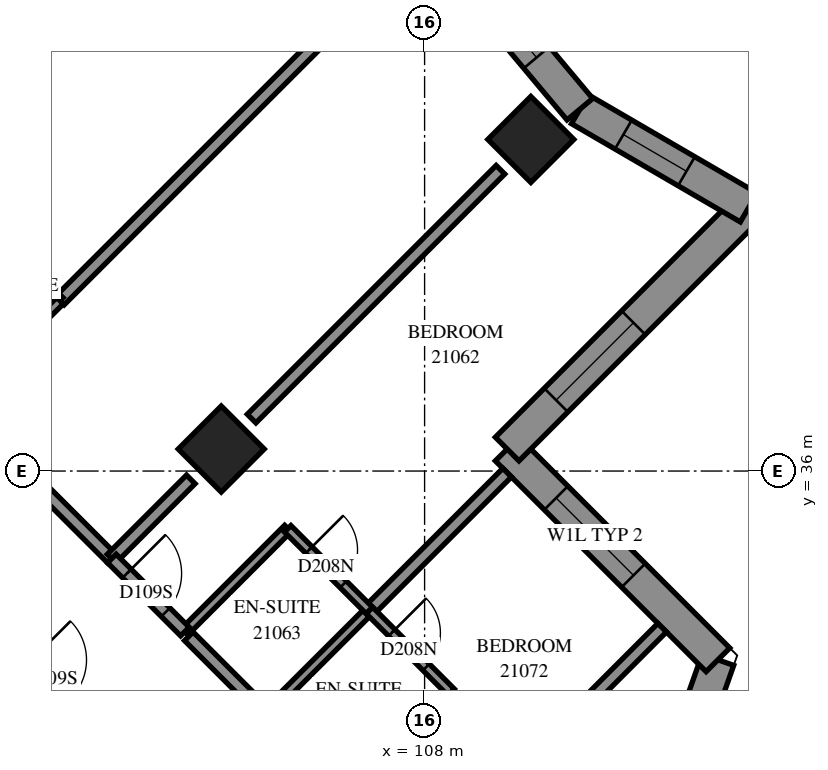
"""IFC4 building model, lengths in metres.
Left out: names, types, materials, properties, quantities, classifications, styles, units other than length and angle.
Written with IfcOpenShell. Run it as: python <this file> out.ifc"""

import sys

from ifc_helpers import new_model, si_unit, direction, frame, frame_2d, origin, origin_2d, place, context, subcontext, project, spatial, polyline, rectangle, outline, extrude, element, fill, save


model = new_model("IFC4")
c1 = context("Model", 3, precision=1e-05, world=origin(), true_north=direction((0.0, 1.0)))
c2 = subcontext(c1, "Body", "Model", "MODEL_VIEW")
j1 = project(units=[si_unit("LENGTHUNIT", "METRE"), si_unit("PLANEANGLEUNIT", "RADIAN")], contexts=[c1])
p1 = place(None, origin())
s1 = spatial("IfcSite", under=j1, at=p1, CompositionType="ELEMENT")
p2 = place(p1, origin())
s2 = spatial("IfcBuilding", under=s1, at=p2, CompositionType="ELEMENT")
p3 = place(p2, frame((0.0, 0.0, 81.2)))
s3 = spatial("IfcBuildingStorey", under=s2, at=p3, CompositionType="ELEMENT", Elevation=81.2)
for number, where, z_axis, x_axis in (
    (1, (109.747, 41.453, 0.0), (0.0, 0.0, 1.0), (0.707, -0.707, 0.0)),
    (2, (104.656, 36.362, 0.0), (0.0, 0.0, 1.0), (0.707, -0.707, 0.0)),
):
    element("IfcColumn", number, at=place(p3, frame(where, z_axis=z_axis, x_axis=x_axis)), inside=s3, PredefinedType="COLUMN", context=c2, shape_type="SweptSolid", body=[
        extrude(rectangle(XDim=1.0, YDim=1.0, at=origin_2d()), origin(), (0.0, 0.0, 1.0), 3.1),
    ])
p4 = place(p3, frame((111.068, 27.928, 0.0), z_axis=(0.0, 0.0, 1.0), x_axis=(0.3333124239, 0.9428164339, 0.0)))
e3 = element("IfcWall", 3, at=p4, inside=s3, PredefinedType="SOLIDWALL", context=c2, shape_type="SweptSolid", body=[
    extrude(outline(polyline([(-0.126, -0.275), (5.443, -0.275), (5.096, 0.275), (0.126, 0.275), (-0.126, -0.275)])), origin(), (0.0, 0.0, 1.0), 3.1),
])
p5 = place(p4, frame((1.434, 0.0, 0.5)))
e4 = element("IfcOpeningElement", 4, at=p5, cuts=e3, PredefinedType="OPENING", context=c2, shape_type="SweptSolid", body=[
    extrude(rectangle(XDim=1.3, YDim=2.45, at=frame_2d((0.65, 1.225))), frame((0.0, 0.285, 0.0), z_axis=(0.0, -1.0, 0.0), x_axis=(1.0, 0.0, 0.0)), (0.0, 0.0, 1.0), 0.57),
])
p6 = place(p4, frame((2.934, 0.0, 0.5)))
e5 = element("IfcOpeningElement", 5, at=p6, cuts=e3, PredefinedType="OPENING", context=c2, shape_type="SweptSolid", body=[
    extrude(rectangle(XDim=1.3, YDim=2.45, at=frame_2d((0.65, 1.225))), frame((0.0, 0.285, 0.0), z_axis=(0.0, -1.0, 0.0), x_axis=(1.0, 0.0, 0.0)), (0.0, 0.0, 1.0), 0.57),
])
p7 = place(p3, frame((112.824, 32.896, 0.0), z_axis=(0.0, 0.0, 1.0), x_axis=(-0.7071067812, 0.7071067812, 0.0)))
e6 = element("IfcWall", 6, at=p7, inside=s3, PredefinedType="SOLIDWALL", context=c2, shape_type="SweptSolid", body=[
    extrude(outline(polyline([(-0.173, -0.275), (4.627, -0.275), (5.177, 0.275), (0.173, 0.275), (-0.173, -0.275)])), origin(), (0.0, 0.0, 1.0), 3.1),
])
p8 = place(p7, frame((1.964, 0.0, 0.6)))
e7 = element("IfcOpeningElement", 7, at=p8, cuts=e6, PredefinedType="OPENING", context=c2, shape_type="SweptSolid", body=[
    extrude(rectangle(XDim=1.8, YDim=1.9, at=frame_2d((0.9, 0.95))), frame((0.0, 0.285, 0.0), z_axis=(0.0, -1.0, 0.0), x_axis=(1.0, 0.0, 0.0)), (0.0, 0.0, 1.0), 0.57),
])
p9 = place(p3, frame((109.358, 36.362, 0.0), z_axis=(0.0, 0.0, 1.0), x_axis=(0.7071067812, 0.7071067812, 0.0)))
e8 = element("IfcWall", 8, at=p9, inside=s3, PredefinedType="SOLIDWALL", context=c2, shape_type="SweptSolid", body=[
    extrude(outline(polyline([(0.275, -0.275), (5.975, -0.275), (5.261, 0.275), (-0.275, 0.275), (0.275, -0.275)])), origin(), (0.0, 0.0, 1.0), 3.1),
])
p10 = place(p9, frame((1.137, 0.0, 0.6)))
e9 = element("IfcOpeningElement", 9, at=p10, cuts=e8, PredefinedType="OPENING", context=c2, shape_type="SweptSolid", body=[
    extrude(rectangle(XDim=1.8, YDim=1.9, at=frame_2d((0.9, 0.95))), frame((0.0, 0.285, 0.0), z_axis=(0.0, -1.0, 0.0), x_axis=(1.0, 0.0, 0.0)), (0.0, 0.0, 1.0), 0.57),
])
p11 = place(p3, frame((113.331, 40.334, 0.0), z_axis=(0.0, 0.0, 1.0), x_axis=(-0.8643225085, 0.5029379696, 0.0)))
e10 = element("IfcWall", 10, at=p11, inside=s3, PredefinedType="SOLIDWALL", context=c2, shape_type="SweptSolid", body=[
    extrude(outline(polyline([(-0.357, -0.275), (3.165, -0.275), (3.261, 0.275), (0.357, 0.275), (-0.357, -0.275)])), origin(), (0.0, 0.0, 1.0), 3.1),
])
p12 = place(p11, frame((1.185, 0.0, 0.5)))
e11 = element("IfcOpeningElement", 11, at=p12, cuts=e10, PredefinedType="OPENING", context=c2, shape_type="SweptSolid", body=[
    extrude(rectangle(XDim=1.2, YDim=2.45, at=frame_2d((0.6, 1.225))), frame((0.0, 0.285, 0.0), z_axis=(0.0, -1.0, 0.0), x_axis=(1.0, 0.0, 0.0)), (0.0, 0.0, 1.0), 0.57),
])
p13 = place(p3, frame((110.553, 41.95, 0.0), z_axis=(0.0, 0.0, 1.0), x_axis=(-0.6423052098, 0.766448966, 0.0)))
e12 = element("IfcWall", 12, at=p13, inside=s3, PredefinedType="SOLIDWALL", context=c2, shape_type="SweptSolid", body=[
    extrude(outline(polyline([(0.048, -0.275), (3.466, -0.275), (3.418, 0.275), (-0.048, 0.275), (0.048, -0.275)])), origin(), (0.0, 0.0, 1.0), 3.1),
])
p14 = place(p13, frame((1.109, 0.0, 0.5)))
e13 = element("IfcOpeningElement", 13, at=p14, cuts=e12, PredefinedType="OPENING", context=c2, shape_type="SweptSolid", body=[
    extrude(rectangle(XDim=1.2, YDim=2.45, at=frame_2d((0.6, 1.225))), frame((0.0, 0.285, 0.0), z_axis=(0.0, -1.0, 0.0), x_axis=(1.0, 0.0, 0.0)), (0.0, 0.0, 1.0), 0.57),
])
p15 = place(p3, frame((95.215, 42.197, 0.0), z_axis=(0.0, 0.0, 1.0), x_axis=(0.7071114855, 0.7071020769, 0.0)))
e14 = element("IfcWall", 14, at=p15, inside=s3, PredefinedType="PARTITIONING", context=c2, shape_type="SweptSolid", body=[
    extrude(rectangle(XDim=10.629, YDim=0.2, at=frame_2d((5.314, 0.0))), origin(), (0.0, 0.0, 1.0), 3.1),
])
p16 = place(p3, frame((102.002, 38.804, 0.0), z_axis=(0.0, 0.0, 1.0), x_axis=(0.7072398927, 0.7069736446, 0.0)))
e15 = element("IfcWall", 15, at=p16, inside=s3, PredefinedType="PARTITIONING", context=c2, shape_type="SweptSolid", body=[
    extrude(rectangle(XDim=8.263, YDim=0.2, at=frame_2d((4.131, 0.0))), origin(), (0.0, 0.0, 1.0), 3.1),
])
p17 = place(p3, frame((101.365, 33.071, 0.0), z_axis=(0.0, 0.0, 1.0), x_axis=(0.7071067812, -0.7071067812, 0.0)))
e16 = element("IfcWall", 16, at=p17, inside=s3, PredefinedType="PARTITIONING", context=c2, shape_type="SweptSolid", body=[
    extrude(rectangle(XDim=7.2, YDim=0.2, at=frame_2d((3.6, 0.0))), origin(), (0.0, 0.0, 1.0), 3.1),
])
p18 = place(p17, frame((0.248, 0.0, 0.0)))
e17 = element("IfcOpeningElement", 17, at=p18, cuts=e16, PredefinedType="OPENING", context=c2, shape_type="SweptSolid", body=[
    extrude(rectangle(XDim=0.9, YDim=2.1, at=frame_2d((0.45, 1.05))), frame((0.0, 0.11, 0.0), z_axis=(0.0, -1.0, 0.0), x_axis=(1.0, 0.0, 0.0)), (0.0, 0.0, 1.0), 0.22),
])
p19 = place(p17, frame((5.95, 0.0, 0.0)))
e18 = element("IfcOpeningElement", 18, at=p19, cuts=e16, PredefinedType="OPENING", context=c2, shape_type="SweptSolid", body=[
    extrude(rectangle(XDim=0.9, YDim=2.1, at=frame_2d((0.45, 1.05))), frame((0.0, 0.11, 0.0), z_axis=(0.0, -1.0, 0.0), x_axis=(1.0, 0.0, 0.0)), (0.0, 0.0, 1.0), 0.22),
])
p20 = place(p3, frame((105.155, 36.863, 0.0), z_axis=(0.0, 0.0, 1.0), x_axis=(0.7071067812, 0.7071067812, 0.0)))
e19 = element("IfcWall", 19, at=p20, inside=s3, PredefinedType="PARTITIONING", context=c2, shape_type="SweptSolid", body=[
    extrude(rectangle(XDim=5.787, YDim=0.2, at=frame_2d((2.893, 0.0))), origin(), (0.0, 0.0, 1.0), 3.1),
])
p21 = place(p3, frame((104.123, 33.282, 0.0), z_axis=(0.0, 0.0, 1.0), x_axis=(0.7071067812, -0.7071067812, 0.0)))
e20 = element("IfcWall", 20, at=p21, inside=s3, PredefinedType="PARTITIONING", context=c2, shape_type="SweptSolid", body=[
    extrude(rectangle(XDim=5.399, YDim=0.2, at=frame_2d((2.7, 0.0))), origin(), (0.0, 0.0, 1.0), 3.1),
])
p22 = place(p21, frame((4.08, 0.0, 0.0)))
e21 = element("IfcOpeningElement", 21, at=p22, cuts=e20, PredefinedType="OPENING", context=c2, shape_type="SweptSolid", body=[
    extrude(rectangle(XDim=0.9, YDim=2.1, at=frame_2d((0.45, 1.05))), frame((0.0, 0.11, 0.0), z_axis=(0.0, -1.0, 0.0), x_axis=(1.0, 0.0, 0.0)), (0.0, 0.0, 1.0), 0.22),
])
p23 = place(p3, frame((100.31, 37.106, 0.0), z_axis=(0.0, 0.0, 1.0), x_axis=(0.7073845681, -0.7068288851, 0.0)))
e22 = element("IfcWall", 22, at=p23, inside=s3, PredefinedType="PARTITIONING", context=c2, shape_type="SweptSolid", body=[
    extrude(rectangle(XDim=3.599, YDim=0.2, at=frame_2d((1.8, 0.0))), origin(), (0.0, 0.0, 1.0), 3.1),
])
p24 = place(p3, frame((107.095, 33.711, 0.0), z_axis=(0.0, 0.0, 1.0), x_axis=(0.7071067812, 0.7071067812, 0.0)))
e23 = element("IfcWall", 23, at=p24, inside=s3, PredefinedType="PARTITIONING", context=c2, shape_type="SweptSolid", body=[
    extrude(rectangle(XDim=3.2, YDim=0.2, at=frame_2d((1.6, 0.0))), origin(), (0.0, 0.0, 1.0), 3.1),
])
p25 = place(p3, frame((100.233, 40.567, 0.0), z_axis=(0.0, 0.0, 1.0), x_axis=(0.7071067812, -0.7071067812, 0.0)))
e24 = element("IfcWall", 24, at=p25, inside=s3, PredefinedType="PARTITIONING", context=c2, shape_type="SweptSolid", body=[
    extrude(rectangle(XDim=2.5, YDim=0.15, at=frame_2d((1.25, 0.0))), origin(), (0.0, 0.0, 1.0), 3.1),
])
p26 = place(p25, frame((0.883, 0.0, 0.0)))
e25 = element("IfcOpeningElement", 25, at=p26, cuts=e24, PredefinedType="OPENING", context=c2, shape_type="SweptSolid", body=[
    extrude(rectangle(XDim=0.8, YDim=2.1, at=frame_2d((0.4, 1.05))), frame((0.0, 0.085, 0.0), z_axis=(0.0, -1.0, 0.0), x_axis=(1.0, 0.0, 0.0)), (0.0, 0.0, 1.0), 0.17),
])
for number, where, z_axis, x_axis in (
    (26, (100.308, 37.103, 0.0), (0.0, 0.0, 1.0), (0.707, 0.708, 0.0)),
    (27, (105.396, 32.016, 0.0), (0.0, 0.0, 1.0), (0.708, 0.707, 0.0)),
):
    element("IfcWall", number, at=place(p3, frame(where, z_axis=z_axis, x_axis=x_axis)), inside=s3, PredefinedType="PARTITIONING", context=c2, shape_type="SweptSolid", body=[
        extrude(rectangle(XDim=2.4, YDim=0.15, at=frame_2d((1.2, 0.0))), origin(), (0.0, 0.0, 1.0), 3.1),
    ])
for number, where, z_axis, x_axis in (
    (28, (104.055, 33.359, 0.0), (0.0, 0.0, 1.0), (0.707, 0.707, 0.0)),
    (29, (106.741, 30.671, 0.0), (0.0, 0.0, 1.0), (0.707, 0.707, 0.0)),
):
    element("IfcWall", number, at=place(p3, frame(where, z_axis=z_axis, x_axis=x_axis)), inside=s3, PredefinedType="PARTITIONING", context=c2, shape_type="SweptSolid", body=[
        extrude(rectangle(XDim=2.398, YDim=0.15, at=frame_2d((1.199, 0.0))), origin(), (0.0, 0.0, 1.0), 3.1),
    ])
p27 = place(p3, frame((110.251, 31.767, 0.0), z_axis=(0.0, 0.0, 1.0), x_axis=(0.7066584143, 0.7075548639, 0.0)))
e30 = element("IfcWall", 30, at=p27, inside=s3, PredefinedType="PARTITIONING", context=c2, shape_type="SweptSolid", body=[
    extrude(rectangle(XDim=2.343, YDim=0.2, at=frame_2d((1.171, 0.0))), origin(), (0.0, 0.0, 1.0), 3.1),
])
p28 = place(p3, frame((105.749, 35.051, 0.0), z_axis=(0.0, 0.0, 1.0), x_axis=(0.7071067812, -0.7071067812, 0.0)))
e31 = element("IfcWall", 31, at=p28, inside=s3, PredefinedType="PARTITIONING", context=c2, shape_type="SweptSolid", body=[
    extrude(rectangle(XDim=1.901, YDim=0.15, at=frame_2d((0.95, 0.0))), origin(), (0.0, 0.0, 1.0), 3.1),
])
p29 = place(p28, frame((0.493, 0.0, 0.0)))
e32 = element("IfcOpeningElement", 32, at=p29, cuts=e31, PredefinedType="OPENING", context=c2, shape_type="SweptSolid", body=[
    extrude(rectangle(XDim=0.8, YDim=2.1, at=frame_2d((0.4, 1.05))), frame((0.0, 0.085, 0.0), z_axis=(0.0, -1.0, 0.0), x_axis=(1.0, 0.0, 0.0)), (0.0, 0.0, 1.0), 0.17),
])
p30 = place(p3, frame((107.094, 33.708, 0.0), z_axis=(0.0, 0.0, 1.0), x_axis=(0.7065800724, -0.7076330979, 0.0)))
e33 = element("IfcWall", 33, at=p30, inside=s3, PredefinedType="PARTITIONING", context=c2, shape_type="SweptSolid", body=[
    extrude(rectangle(XDim=1.899, YDim=0.15, at=frame_2d((0.95, 0.0))), origin(), (0.0, 0.0, 1.0), 3.1),
])
p31 = place(p30, frame((0.519, 0.0, 0.0)))
e34 = element("IfcOpeningElement", 34, at=p31, cuts=e33, PredefinedType="OPENING", context=c2, shape_type="SweptSolid", body=[
    extrude(rectangle(XDim=0.8, YDim=2.1, at=frame_2d((0.4, 1.05))), frame((0.0, 0.085, 0.0), z_axis=(0.0, -1.0, 0.0), x_axis=(1.0, 0.0, 0.0)), (0.0, 0.0, 1.0), 0.17),
])
p32 = place(p3, frame((102.853, 34.561, 0.0), z_axis=(0.0, 0.0, 1.0), x_axis=(0.7071067812, 0.7071067812, 0.0)))
e35 = element("IfcWall", 35, at=p32, inside=s3, PredefinedType="PARTITIONING", context=c2, shape_type="SweptSolid", body=[
    extrude(rectangle(XDim=1.841, YDim=0.2, at=frame_2d((0.921, 0.0))), origin(), (0.0, 0.0, 1.0), 3.1),
])
p33 = place(p3, frame((102.857, 34.563, 0.0), z_axis=(0.0, 0.0, 1.0), x_axis=(0.7071067812, -0.7071067812, 0.0)))
e36 = element("IfcWall", 36, at=p33, inside=s3, PredefinedType="PARTITIONING", context=c2, shape_type="SweptSolid", body=[
    extrude(rectangle(XDim=1.7, YDim=0.2, at=frame_2d((0.85, 0.0))), origin(), (0.0, 0.0, 1.0), 3.1),
])
p34 = place(p33, frame((0.35, 0.0, 0.0)))
e37 = element("IfcOpeningElement", 37, at=p34, cuts=e36, PredefinedType="OPENING", context=c2, shape_type="SweptSolid", body=[
    extrude(rectangle(XDim=0.9, YDim=2.1, at=frame_2d((0.45, 1.05))), frame((0.0, 0.11, 0.0), z_axis=(0.0, -1.0, 0.0), x_axis=(1.0, 0.0, 0.0)), (0.0, 0.0, 1.0), 0.22),
])
p35 = place(p8, origin())
e38 = element("IfcWindow", 38, at=p35, inside=s3, PartitioningType="SINGLE_PANEL", PredefinedType="WINDOW", context=c2, shape_type="SweptSolid", body=[
    extrude(rectangle(XDim=1.8, YDim=1.9, at=frame_2d((0.9, 0.95))), frame((0.0, 0.155, 0.0), z_axis=(0.0, -1.0, 0.0), x_axis=(1.0, 0.0, 0.0)), (0.0, 0.0, 1.0), 0.06),
])
fill(e7, e38)
p36 = place(p10, origin())
e39 = element("IfcWindow", 39, at=p36, inside=s3, PartitioningType="SINGLE_PANEL", PredefinedType="WINDOW", context=c2, shape_type="SweptSolid", body=[
    extrude(rectangle(XDim=1.8, YDim=1.9, at=frame_2d((0.9, 0.95))), frame((0.0, 0.155, 0.0), z_axis=(0.0, -1.0, 0.0), x_axis=(1.0, 0.0, 0.0)), (0.0, 0.0, 1.0), 0.06),
])
fill(e9, e39)
p37 = place(p12, origin())
e40 = element("IfcWindow", 40, at=p37, inside=s3, PartitioningType="SINGLE_PANEL", PredefinedType="WINDOW", context=c2, shape_type="SweptSolid", body=[
    extrude(rectangle(XDim=1.2, YDim=2.45, at=frame_2d((0.6, 1.225))), frame((0.0, 0.155, 0.0), z_axis=(0.0, -1.0, 0.0), x_axis=(1.0, 0.0, 0.0)), (0.0, 0.0, 1.0), 0.06),
])
fill(e11, e40)
p38 = place(p14, origin())
e41 = element("IfcWindow", 41, at=p38, inside=s3, PartitioningType="SINGLE_PANEL", PredefinedType="WINDOW", context=c2, shape_type="SweptSolid", body=[
    extrude(rectangle(XDim=1.2, YDim=2.45, at=frame_2d((0.6, 1.225))), frame((0.0, 0.155, 0.0), z_axis=(0.0, -1.0, 0.0), x_axis=(1.0, 0.0, 0.0)), (0.0, 0.0, 1.0), 0.06),
])
fill(e13, e41)
p39 = place(p34, origin())
e42 = element("IfcDoor", 42, at=p39, inside=s3, OperationType="SINGLE_SWING_LEFT", PredefinedType="DOOR", context=c2, shape_type="SweptSolid", body=[
    extrude(rectangle(XDim=0.9, YDim=2.1, at=frame_2d((0.45, 1.05))), frame((0.0, 0.025, 0.0), z_axis=(0.0, -1.0, 0.0), x_axis=(1.0, 0.0, 0.0)), (0.0, 0.0, 1.0), 0.05),
])
fill(e37, e42)
p40 = place(p29, origin())
e43 = element("IfcDoor", 43, at=p40, inside=s3, OperationType="SINGLE_SWING_RIGHT", PredefinedType="DOOR", context=c2, shape_type="SweptSolid", body=[
    extrude(rectangle(XDim=0.8, YDim=2.1, at=frame_2d((0.4, 1.05))), frame((0.0, 0.025, 0.0), z_axis=(0.0, -1.0, 0.0), x_axis=(1.0, 0.0, 0.0)), (0.0, 0.0, 1.0), 0.05),
])
fill(e32, e43)
p41 = place(p18, origin())
e44 = element("IfcDoor", 44, at=p41, inside=s3, OperationType="SINGLE_SWING_RIGHT", PredefinedType="DOOR", context=c2, shape_type="SweptSolid", body=[
    extrude(rectangle(XDim=0.9, YDim=2.1, at=frame_2d((0.45, 1.05))), frame((0.0, 0.025, 0.0), z_axis=(0.0, -1.0, 0.0), x_axis=(1.0, 0.0, 0.0)), (0.0, 0.0, 1.0), 0.05),
])
fill(e17, e44)
p42 = place(p31, origin())
e45 = element("IfcDoor", 45, at=p42, inside=s3, OperationType="SINGLE_SWING_RIGHT", PredefinedType="DOOR", context=c2, shape_type="SweptSolid", body=[
    extrude(rectangle(XDim=0.8, YDim=2.1, at=frame_2d((0.4, 1.05))), frame((0.0, 0.025, 0.0), z_axis=(0.0, -1.0, 0.0), x_axis=(1.0, 0.0, 0.0)), (0.0, 0.0, 1.0), 0.05),
])
fill(e34, e45)
save(model, sys.argv[1])
